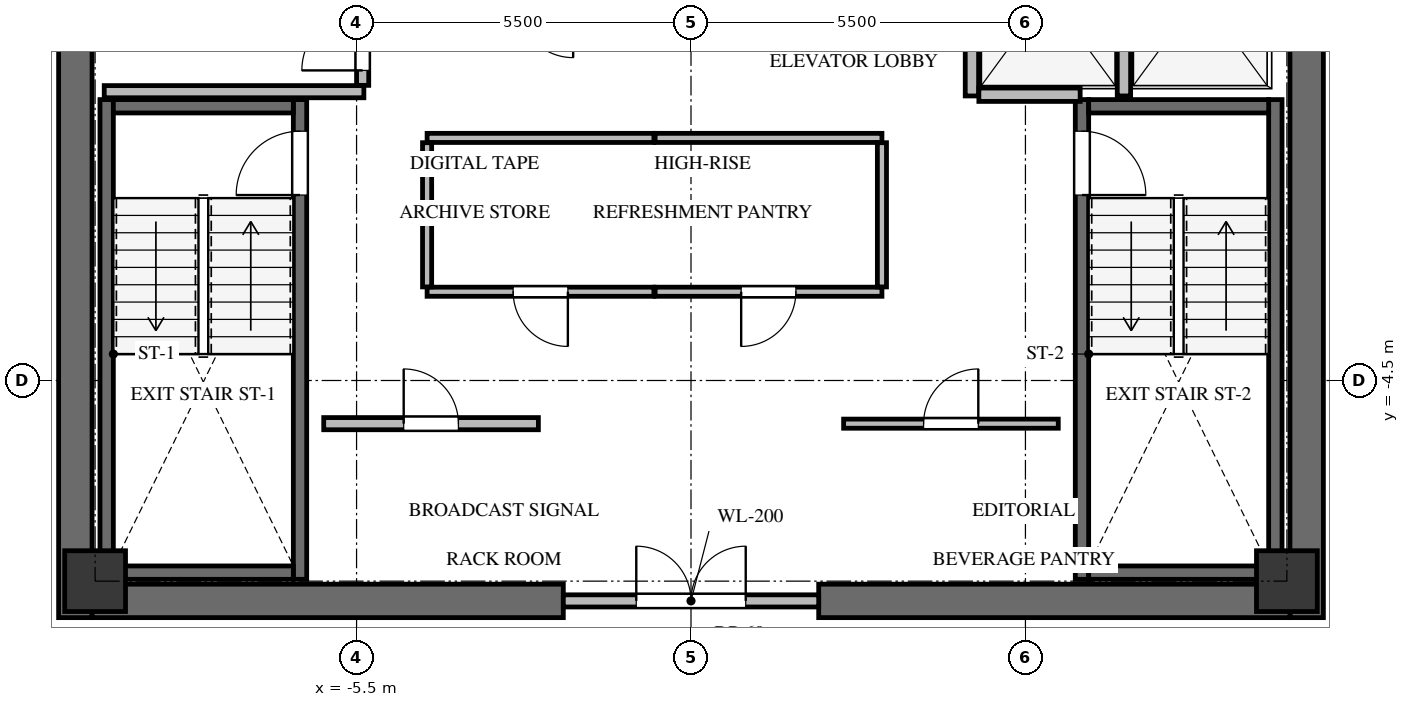
"""IFC4 building model, lengths in metres.
Left out: names, types, materials, properties, quantities, classifications, styles, units other than length and angle.
Written with IfcOpenShell. Run it as: python <this file> out.ifc"""

import sys

from ifc_helpers import new_model, si_unit, direction, frame, frame_2d, origin, origin_2d, place, context, subcontext, project, spatial, rectangle, extrude, source, transform, mapped, element, fill, save


model = new_model("IFC4")
c1 = context("Model", 3, precision=1e-05, world=origin(), true_north=direction((0.0, 1.0)))
c2 = subcontext(c1, "Body", "Model", "MODEL_VIEW")
j1 = project(units=[si_unit("LENGTHUNIT", "METRE"), si_unit("PLANEANGLEUNIT", "RADIAN")], contexts=[c1])
p1 = place(None, origin())
s1 = spatial("IfcSite", under=j1, at=p1, CompositionType="ELEMENT")
p2 = place(p1, origin())
s2 = spatial("IfcBuilding", under=s1, at=p2, CompositionType="ELEMENT")
p3 = place(p2, frame((0.0, 0.0, 224.9)))
s3 = spatial("IfcBuildingStorey", under=s2, at=p3, CompositionType="ELEMENT", Elevation=224.9)
for number, where, z_axis, x_axis in (
    (1, (-10.125, -8.4, 0.0), (0.0, 0.0, 1.0), (0.0, 1.0, 0.0)),
    (2, (10.125, -8.4, 0.0), (0.0, 0.0, 1.0), (0.0, 1.0, 0.0)),
):
    element("IfcWall", number, at=place(p3, frame(where, z_axis=z_axis, x_axis=x_axis)), inside=s3, PredefinedType="SHEAR", context=c2, shape_type="SweptSolid", body=[
        extrude(rectangle(XDim=16.8, YDim=0.55, at=frame_2d((8.4, 0.0))), origin(), (0.0, 0.0, 1.0), 3.3),
    ])
for number, where, z_axis, x_axis in (
    (3, (-9.85, -8.125, 0.0), (0.0, 0.0, 1.0), (1.0, 0.0, 0.0)),
    (4, (2.1, -8.125, 0.0), (0.0, 0.0, 1.0), (1.0, 0.0, 0.0)),
):
    element("IfcWall", number, at=place(p3, frame(where, z_axis=z_axis, x_axis=x_axis)), inside=s3, PredefinedType="SHEAR", context=c2, shape_type="SweptSolid", body=[
        extrude(rectangle(XDim=7.75, YDim=0.55, at=frame_2d((3.875, 0.0))), origin(), (0.0, 0.0, 1.0), 3.3),
    ])
p4 = place(p3, frame((-6.43, -7.77, -0.24), z_axis=(0.0, 0.0, 1.0), x_axis=(0.0, 1.0, 0.0)))
e5 = element("IfcWall", 5, at=p4, inside=s3, PredefinedType="SHEAR", context=c2, shape_type="SweptSolid", body=[
    extrude(rectangle(XDim=7.89, YDim=0.22, at=frame_2d((3.945, 0.0))), origin(), (0.0, 0.0, 1.0), 3.3),
])
p5 = place(p4, frame((6.32, 0.0, 0.0)))
e6 = element("IfcOpeningElement", 6, at=p5, cuts=e5, PredefinedType="OPENING", context=c2, shape_type="SweptSolid", body=[
    extrude(rectangle(XDim=1.05, YDim=2.15, at=frame_2d((0.525, 1.075))), frame((0.0, 0.12, 0.0), z_axis=(0.0, -1.0, 0.0), x_axis=(1.0, 0.0, 0.0)), (0.0, 0.0, 1.0), 0.24),
])
p6 = place(p3, frame((-9.61, 0.12, -0.24), z_axis=(0.0, 0.0, 1.0), x_axis=(0.0, -1.0, 0.0)))
e7 = element("IfcWall", 7, at=p6, inside=s3, PredefinedType="SHEAR", context=c2, shape_type="SweptSolid", body=[
    extrude(rectangle(XDim=7.89, YDim=0.22, at=frame_2d((3.945, 0.0))), origin(), (0.0, 0.0, 1.0), 3.3),
])
for number, where, z_axis, x_axis in (
    (8, (-9.5, -7.66, -0.24), (0.0, 0.0, 1.0), (1.0, 0.0, 0.0)),
    (9, (-6.54, 0.01, -0.24), (0.0, 0.0, 1.0), (-1.0, 0.0, 0.0)),
):
    element("IfcWall", number, at=place(p3, frame(where, z_axis=z_axis, x_axis=x_axis)), inside=s3, PredefinedType="SHEAR", context=c2, shape_type="SweptSolid", body=[
        extrude(rectangle(XDim=2.96, YDim=0.22, at=frame_2d((1.48, 0.0))), origin(), (0.0, 0.0, 1.0), 3.3),
    ])
p7 = place(p3, frame((9.61, -7.77, -0.24), z_axis=(0.0, 0.0, 1.0), x_axis=(0.0, 1.0, 0.0)))
e10 = element("IfcWall", 10, at=p7, inside=s3, PredefinedType="SHEAR", context=c2, shape_type="SweptSolid", body=[
    extrude(rectangle(XDim=7.89, YDim=0.22, at=frame_2d((3.945, 0.0))), origin(), (0.0, 0.0, 1.0), 3.3),
])
p8 = place(p3, frame((6.43, 0.12, -0.24), z_axis=(0.0, 0.0, 1.0), x_axis=(0.0, -1.0, 0.0)))
e11 = element("IfcWall", 11, at=p8, inside=s3, PredefinedType="SHEAR", context=c2, shape_type="SweptSolid", body=[
    extrude(rectangle(XDim=7.89, YDim=0.22, at=frame_2d((3.945, 0.0))), origin(), (0.0, 0.0, 1.0), 3.3),
])
p9 = place(p8, frame((0.52, 0.0, 0.0)))
e12 = element("IfcOpeningElement", 12, at=p9, cuts=e11, PredefinedType="OPENING", context=c2, shape_type="SweptSolid", body=[
    extrude(rectangle(XDim=1.05, YDim=2.15, at=frame_2d((0.525, 1.075))), frame((0.0, 0.12, 0.0), z_axis=(0.0, -1.0, 0.0), x_axis=(1.0, 0.0, 0.0)), (0.0, 0.0, 1.0), 0.24),
])
for number, where, z_axis, x_axis in (
    (13, (6.54, -7.66, -0.24), (0.0, 0.0, 1.0), (1.0, 0.0, 0.0)),
    (14, (9.5, 0.01, -0.24), (0.0, 0.0, 1.0), (-1.0, 0.0, 0.0)),
):
    element("IfcWall", number, at=place(p3, frame(where, z_axis=z_axis, x_axis=x_axis)), inside=s3, PredefinedType="SHEAR", context=c2, shape_type="SweptSolid", body=[
        extrude(rectangle(XDim=2.96, YDim=0.22, at=frame_2d((1.48, 0.0))), origin(), (0.0, 0.0, 1.0), 3.3),
    ])
m1 = source(origin(), c2, "Body", "SweptSolid", [
    extrude(rectangle(XDim=1.0, YDim=1.0, at=origin_2d()), origin(), (0.0, 0.0, 1.0), 3.3),
])
for number, where, z_axis, x_axis in (
    (15, (-9.8, -7.8, -0.24), (0.0, 0.0, 1.0), (1.0, 0.0, 0.0)),
    (16, (9.8, -7.8, -0.24), (0.0, 0.0, 1.0), (1.0, 0.0, 0.0)),
):
    element("IfcColumn", number, at=place(p3, frame(where, z_axis=z_axis, x_axis=x_axis)), inside=s3, PredefinedType="COLUMN", context=c2, shape_type="MappedRepresentation", body=[
        mapped(m1, transform((0.0, 0.0, 0.0), x_axis=(1.0, 0.0, 0.0), y_axis=(0.0, 1.0, 0.0), z_axis=(0.0, 0.0, 1.0), scale=1.0)),
    ])
p10 = place(p3, frame((-2.1, -8.125, 0.0), z_axis=(0.0, 0.0, 1.0), x_axis=(1.0, 0.0, 0.0)))
e17 = element("IfcWall", 17, at=p10, inside=s3, PredefinedType="SOLIDWALL", context=c2, shape_type="SweptSolid", body=[
    extrude(rectangle(XDim=4.2, YDim=0.2, at=frame_2d((2.1, 0.0))), origin(), (0.0, 0.0, 1.0), 3.045),
])
p11 = place(p10, frame((1.2, 0.0, 0.0)))
e18 = element("IfcOpeningElement", 18, at=p11, cuts=e17, PredefinedType="OPENING", context=c2, shape_type="SweptSolid", body=[
    extrude(rectangle(XDim=1.8, YDim=2.15, at=frame_2d((0.9, 1.075))), frame((0.0, 0.11, 0.0), z_axis=(0.0, -1.0, 0.0), x_axis=(1.0, 0.0, 0.0)), (0.0, 0.0, 1.0), 0.22),
])
p12 = place(p3, frame((-9.65, 0.25, 0.0), z_axis=(0.0, 0.0, 1.0), x_axis=(1.0, 0.0, 0.0)))
e19 = element("IfcWall", 19, at=p12, inside=s3, PredefinedType="SOLIDWALL", context=c2, shape_type="SweptSolid", body=[
    extrude(rectangle(XDim=4.27, YDim=0.2, at=frame_2d((2.135, 0.0))), origin(), (0.0, 0.0, 1.0), 3.045),
])
p13 = place(p3, frame((-5.4, 0.354, 0.0), z_axis=(0.0, 0.0, 1.0), x_axis=(0.0, 1.0, 0.0)))
e20 = element("IfcWall", 20, at=p13, inside=s3, PredefinedType="SOLIDWALL", context=c2, shape_type="SweptSolid", body=[
    extrude(rectangle(XDim=4.026, YDim=0.2, at=frame_2d((2.013, 0.0))), origin(), (0.0, 0.0, 1.0), 3.045),
])
p14 = place(p13, frame((0.246, 0.0, 0.0)))
e21 = element("IfcOpeningElement", 21, at=p14, cuts=e20, PredefinedType="OPENING", context=c2, shape_type="SweptSolid", body=[
    extrude(rectangle(XDim=1.0, YDim=2.15, at=frame_2d((0.5, 1.075))), frame((0.0, 0.11, 0.0), z_axis=(0.0, -1.0, 0.0), x_axis=(1.0, 0.0, 0.0)), (0.0, 0.0, 1.0), 0.22),
])
for number, where, z_axis, x_axis in (
    (22, (4.62, 0.18, 0.0), (0.0, 0.0, 1.0), (0.0, 1.0, 0.0)),
    (23, (7.12, 0.18, 0.0), (0.0, 0.0, 1.0), (0.0, 1.0, 0.0)),
):
    element("IfcWall", number, at=place(p3, frame(where, z_axis=z_axis, x_axis=x_axis)), inside=s3, PredefinedType="SOLIDWALL", context=c2, shape_type="SweptSolid", body=[
        extrude(rectangle(XDim=3.186, YDim=0.22, at=frame_2d((1.593, 0.0))), origin(), (0.0, 0.0, 1.0), 3.045),
    ])
p15 = place(p3, frame((4.734, 0.2, 0.0), z_axis=(0.0, 0.0, 1.0), x_axis=(1.0, 0.0, 0.0)))
e24 = element("IfcWall", 24, at=p15, inside=s3, PredefinedType="SOLIDWALL", context=c2, shape_type="SweptSolid", body=[
    extrude(rectangle(XDim=1.666, YDim=0.22, at=frame_2d((0.833, 0.0))), origin(), (0.0, 0.0, 1.0), 3.045),
])
p16 = place(p3, frame((-6.04, -5.21, 0.0), z_axis=(0.0, 0.0, 1.0), x_axis=(1.0, 0.0, 0.0)))
e25 = element("IfcWall", 25, at=p16, inside=s3, PredefinedType="SOLIDWALL", context=c2, shape_type="SweptSolid", body=[
    extrude(rectangle(XDim=3.53, YDim=0.2, at=frame_2d((1.765, 0.0))), origin(), (0.0, 0.0, 1.0), 3.045),
])
p17 = place(p16, frame((1.315, 0.0, 0.0)))
e26 = element("IfcOpeningElement", 26, at=p17, cuts=e25, PredefinedType="OPENING", context=c2, shape_type="SweptSolid", body=[
    extrude(rectangle(XDim=0.9, YDim=2.05, at=frame_2d((0.45, 1.025))), frame((0.0, 0.11, 0.0), z_axis=(0.0, -1.0, 0.0), x_axis=(1.0, 0.0, 0.0)), (0.0, 0.0, 1.0), 0.22),
])
p18 = place(p3, frame((2.51, -5.21, 0.0), z_axis=(0.0, 0.0, 1.0), x_axis=(1.0, 0.0, 0.0)))
e27 = element("IfcWall", 27, at=p18, inside=s3, PredefinedType="PARTITIONING", context=c2, shape_type="SweptSolid", body=[
    extrude(rectangle(XDim=3.53, YDim=0.15, at=frame_2d((1.765, 0.0))), origin(), (0.0, 0.0, 1.0), 3.045),
])
p19 = place(p18, frame((1.315, 0.0, 0.0)))
e28 = element("IfcOpeningElement", 28, at=p19, cuts=e27, PredefinedType="OPENING", context=c2, shape_type="SweptSolid", body=[
    extrude(rectangle(XDim=0.9, YDim=2.05, at=frame_2d((0.45, 1.025))), frame((0.0, 0.085, 0.0), z_axis=(0.0, -1.0, 0.0), x_axis=(1.0, 0.0, 0.0)), (0.0, 0.0, 1.0), 0.17),
])
p20 = place(p3, frame((-0.61, -3.04, 0.0), z_axis=(0.0, 0.0, 1.0), x_axis=(-1.0, 0.0, 0.0)))
e29 = element("IfcWall", 29, at=p20, inside=s3, PredefinedType="PARTITIONING", context=c2, shape_type="SweptSolid", body=[
    extrude(rectangle(XDim=3.73, YDim=0.15, at=frame_2d((1.865, 0.0))), origin(), (0.0, 0.0, 1.0), 3.045),
])
p21 = place(p20, frame((1.415, 0.0, 0.0)))
e30 = element("IfcOpeningElement", 30, at=p21, cuts=e29, PredefinedType="OPENING", context=c2, shape_type="SweptSolid", body=[
    extrude(rectangle(XDim=0.9, YDim=2.05, at=frame_2d((0.45, 1.025))), frame((0.0, 0.085, 0.0), z_axis=(0.0, -1.0, 0.0), x_axis=(1.0, 0.0, 0.0)), (0.0, 0.0, 1.0), 0.17),
])
p22 = place(p3, frame((-4.34, -0.51, 0.0), z_axis=(0.0, 0.0, 1.0), x_axis=(1.0, 0.0, 0.0)))
e31 = element("IfcWall", 31, at=p22, inside=s3, PredefinedType="PARTITIONING", context=c2, shape_type="SweptSolid", body=[
    extrude(rectangle(XDim=3.73, YDim=0.15, at=frame_2d((1.865, 0.0))), origin(), (0.0, 0.0, 1.0), 3.045),
])
p23 = place(p3, frame((-4.34, -2.961, 0.0), z_axis=(0.0, 0.0, 1.0), x_axis=(0.0, 1.0, 0.0)))
e32 = element("IfcWall", 32, at=p23, inside=s3, PredefinedType="PARTITIONING", context=c2, shape_type="SweptSolid", body=[
    extrude(rectangle(XDim=2.372, YDim=0.15, at=frame_2d((1.186, 0.0))), origin(), (0.0, 0.0, 1.0), 3.045),
])
p24 = place(p3, frame((3.14, -3.04, 0.0), z_axis=(0.0, 0.0, 1.0), x_axis=(-1.0, 0.0, 0.0)))
e33 = element("IfcWall", 33, at=p24, inside=s3, PredefinedType="PARTITIONING", context=c2, shape_type="SweptSolid", body=[
    extrude(rectangle(XDim=3.73, YDim=0.15, at=frame_2d((1.865, 0.0))), origin(), (0.0, 0.0, 1.0), 3.045),
])
p25 = place(p24, frame((1.415, 0.0, 0.0)))
e34 = element("IfcOpeningElement", 34, at=p25, cuts=e33, PredefinedType="OPENING", context=c2, shape_type="SweptSolid", body=[
    extrude(rectangle(XDim=0.9, YDim=2.05, at=frame_2d((0.45, 1.025))), frame((0.0, 0.085, 0.0), z_axis=(0.0, -1.0, 0.0), x_axis=(1.0, 0.0, 0.0)), (0.0, 0.0, 1.0), 0.17),
])
p26 = place(p3, frame((-0.59, -0.51, 0.0), z_axis=(0.0, 0.0, 1.0), x_axis=(1.0, 0.0, 0.0)))
e35 = element("IfcWall", 35, at=p26, inside=s3, PredefinedType="PARTITIONING", context=c2, shape_type="SweptSolid", body=[
    extrude(rectangle(XDim=3.73, YDim=0.15, at=frame_2d((1.865, 0.0))), origin(), (0.0, 0.0, 1.0), 3.045),
])
p27 = place(p3, frame((3.14, -0.589, 0.0), z_axis=(0.0, 0.0, 1.0), x_axis=(0.0, -1.0, 0.0)))
e36 = element("IfcWall", 36, at=p27, inside=s3, PredefinedType="PARTITIONING", context=c2, shape_type="SweptSolid", body=[
    extrude(rectangle(XDim=2.372, YDim=0.15, at=frame_2d((1.186, 0.0))), origin(), (0.0, 0.0, 1.0), 3.045),
])
m2 = source(origin(), c2, "Body", "SweptSolid", [
    extrude(rectangle(XDim=1.05, YDim=2.15, at=frame_2d((0.525, 1.075))), frame((0.0, 0.025, 0.0), z_axis=(0.0, -1.0, 0.0), x_axis=(1.0, 0.0, 0.0)), (0.0, 0.0, 1.0), 0.05),
])
p28 = place(p5, origin())
e37 = element("IfcDoor", 37, at=p28, inside=s3, OperationType="SINGLE_SWING_LEFT", PredefinedType="DOOR", context=c2, shape_type="MappedRepresentation", body=[
    mapped(m2, transform((0.0, 0.0, 0.0), x_axis=(1.0, 0.0, 0.0), y_axis=(0.0, 1.0, 0.0), z_axis=(0.0, 0.0, 1.0), scale=1.0)),
])
fill(e6, e37)
m3 = source(origin(), c2, "Body", "SweptSolid", [
    extrude(rectangle(XDim=1.05, YDim=2.15, at=frame_2d((0.525, 1.075))), frame((0.0, 0.025, 0.0), z_axis=(0.0, -1.0, 0.0), x_axis=(1.0, 0.0, 0.0)), (0.0, 0.0, 1.0), 0.05),
])
p29 = place(p9, origin())
e38 = element("IfcDoor", 38, at=p29, inside=s3, OperationType="SINGLE_SWING_RIGHT", PredefinedType="DOOR", context=c2, shape_type="MappedRepresentation", body=[
    mapped(m3, transform((0.0, 0.0, 0.0), x_axis=(1.0, 0.0, 0.0), y_axis=(0.0, 1.0, 0.0), z_axis=(0.0, 0.0, 1.0), scale=1.0)),
])
fill(e12, e38)
m4 = source(origin(), c2, "Body", "SweptSolid", [
    extrude(rectangle(XDim=1.8, YDim=2.15, at=frame_2d((0.9, 1.075))), frame((0.0, 0.025, 0.0), z_axis=(0.0, -1.0, 0.0), x_axis=(1.0, 0.0, 0.0)), (0.0, 0.0, 1.0), 0.05),
])
p30 = place(p11, origin())
e39 = element("IfcDoor", 39, at=p30, inside=s3, OperationType="DOUBLE_DOOR_SINGLE_SWING", PredefinedType="DOOR", context=c2, shape_type="MappedRepresentation", body=[
    mapped(m4, transform((0.0, 0.0, 0.0), x_axis=(1.0, 0.0, 0.0), y_axis=(0.0, 1.0, 0.0), z_axis=(0.0, 0.0, 1.0), scale=1.0)),
])
fill(e18, e39)
m5 = source(origin(), c2, "Body", "SweptSolid", [
    extrude(rectangle(XDim=1.0, YDim=2.15, at=frame_2d((0.5, 1.075))), frame((0.0, 0.025, 0.0), z_axis=(0.0, -1.0, 0.0), x_axis=(1.0, 0.0, 0.0)), (0.0, 0.0, 1.0), 0.05),
])
p31 = place(p14, origin())
e40 = element("IfcDoor", 40, at=p31, inside=s3, OperationType="SINGLE_SWING_LEFT", PredefinedType="DOOR", context=c2, shape_type="MappedRepresentation", body=[
    mapped(m5, transform((0.0, 0.0, 0.0), x_axis=(1.0, 0.0, 0.0), y_axis=(0.0, 1.0, 0.0), z_axis=(0.0, 0.0, 1.0), scale=1.0)),
])
fill(e21, e40)
m6 = source(origin(), c2, "Body", "SweptSolid", [
    extrude(rectangle(XDim=0.9, YDim=2.05, at=frame_2d((0.45, 1.025))), frame((0.0, 0.025, 0.0), z_axis=(0.0, -1.0, 0.0), x_axis=(1.0, 0.0, 0.0)), (0.0, 0.0, 1.0), 0.05),
])
p32 = place(p17, origin())
e41 = element("IfcDoor", 41, at=p32, inside=s3, OperationType="SINGLE_SWING_LEFT", PredefinedType="DOOR", context=c2, shape_type="MappedRepresentation", body=[
    mapped(m6, transform((0.0, 0.0, 0.0), x_axis=(1.0, 0.0, 0.0), y_axis=(0.0, 1.0, 0.0), z_axis=(0.0, 0.0, 1.0), scale=1.0)),
])
fill(e26, e41)
m7 = source(origin(), c2, "Body", "SweptSolid", [
    extrude(rectangle(XDim=0.9, YDim=2.05, at=frame_2d((0.45, 1.025))), frame((0.0, 0.025, 0.0), z_axis=(0.0, -1.0, 0.0), x_axis=(1.0, 0.0, 0.0)), (0.0, 0.0, 1.0), 0.05),
])
p33 = place(p19, origin())
e42 = element("IfcDoor", 42, at=p33, inside=s3, OperationType="SINGLE_SWING_RIGHT", PredefinedType="DOOR", context=c2, shape_type="MappedRepresentation", body=[
    mapped(m7, transform((0.0, 0.0, 0.0), x_axis=(1.0, 0.0, 0.0), y_axis=(0.0, 1.0, 0.0), z_axis=(0.0, 0.0, 1.0), scale=1.0)),
])
fill(e28, e42)
p34 = place(p21, origin())
e43 = element("IfcDoor", 43, at=p34, inside=s3, OperationType="SINGLE_SWING_LEFT", PredefinedType="DOOR", context=c2, shape_type="MappedRepresentation", body=[
    mapped(m6, transform((0.0, 0.0, 0.0), x_axis=(1.0, 0.0, 0.0), y_axis=(0.0, 1.0, 0.0), z_axis=(0.0, 0.0, 1.0), scale=1.0)),
])
fill(e30, e43)
p35 = place(p25, origin())
e44 = element("IfcDoor", 44, at=p35, inside=s3, OperationType="SINGLE_SWING_RIGHT", PredefinedType="DOOR", context=c2, shape_type="MappedRepresentation", body=[
    mapped(m7, transform((0.0, 0.0, 0.0), x_axis=(1.0, 0.0, 0.0), y_axis=(0.0, 1.0, 0.0), z_axis=(0.0, 0.0, 1.0), scale=1.0)),
])
fill(e34, e44)
save(model, sys.argv[1])
